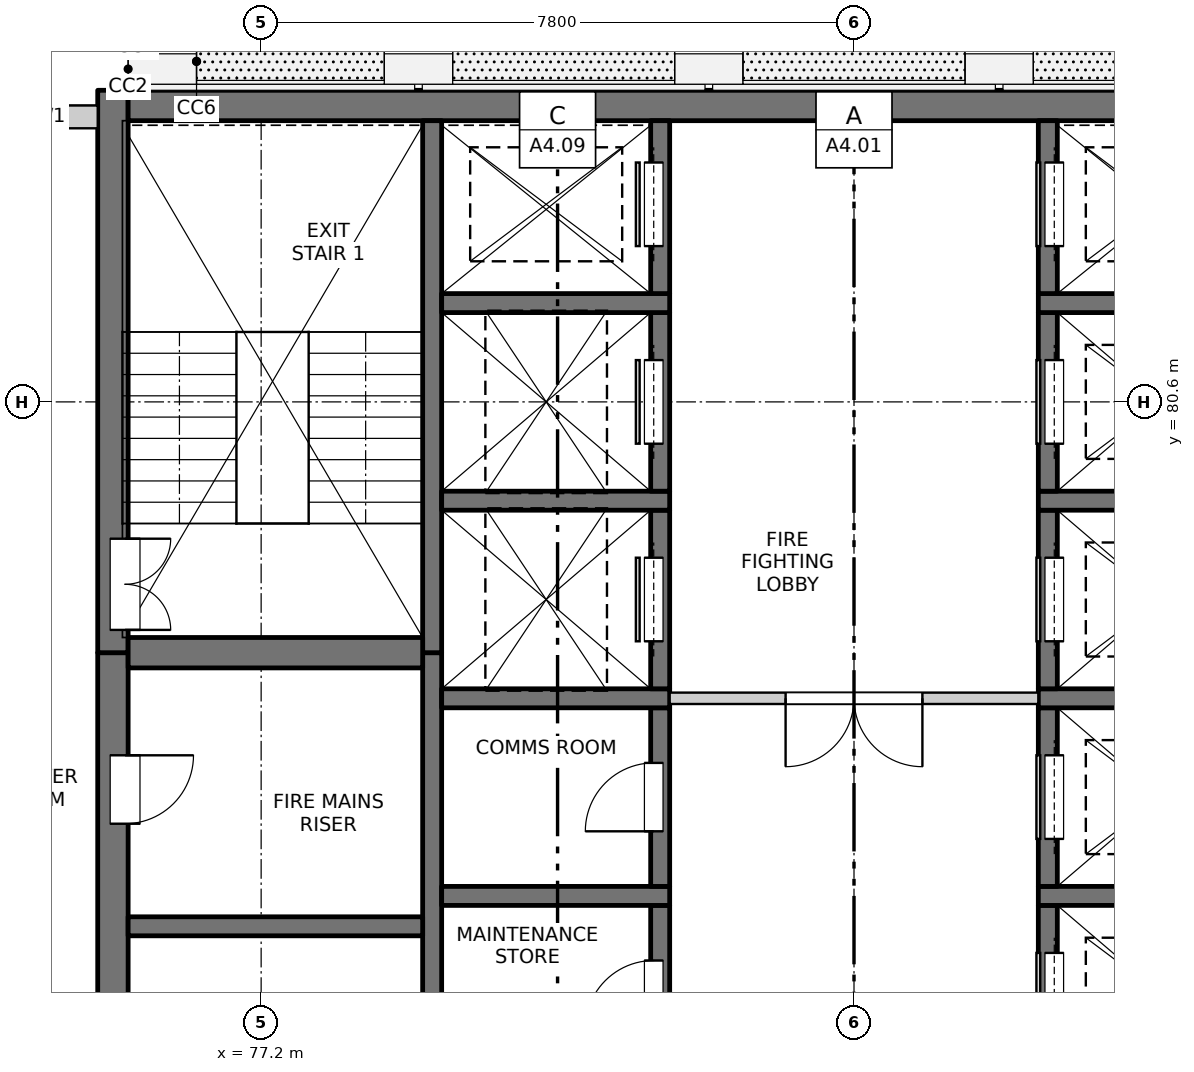
"""IFC4 building model, lengths in metres.
Left out: names, types, materials, properties, quantities, classifications, styles, units other than length and angle.
Written with IfcOpenShell. Run it as: python <this file> out.ifc"""

import sys

from ifc_helpers import new_model, si_unit, direction, frame, frame_2d, origin, place, context, subcontext, project, spatial, rectangle, extrude, element, fill, save


model = new_model("IFC4")
c1 = context("Model", 3, precision=1e-05, world=origin(), true_north=direction((0.0, 1.0)))
c2 = subcontext(c1, "Body", "Model", "MODEL_VIEW")
j1 = project(units=[si_unit("LENGTHUNIT", "METRE"), si_unit("PLANEANGLEUNIT", "RADIAN")], contexts=[c1])
p1 = place(None, origin())
s1 = spatial("IfcSite", under=j1, at=p1, CompositionType="ELEMENT")
p2 = place(p1, origin())
s2 = spatial("IfcBuilding", under=s1, at=p2, CompositionType="ELEMENT")
p3 = place(p2, frame((0.0, 0.0, 252.8)))
s3 = spatial("IfcBuildingStorey", under=s2, at=p3, CompositionType="ELEMENT", Elevation=252.8)
p4 = place(p3, frame((75.25, 55.05, -0.25), z_axis=(0.0, 0.0, 1.0), x_axis=(0.0, 1.0, 0.0)))
e1 = element("IfcWall", 1, at=p4, inside=s3, PredefinedType="SOLIDWALL", context=c2, shape_type="SweptSolid", body=[
    extrude(rectangle(XDim=22.25, YDim=0.4, at=frame_2d((11.125, 0.0))), origin(), (0.0, 0.0, 1.0), 3.4),
])
p5 = place(p4, frame((7.4, 0.0, 0.25)))
e2 = element("IfcOpeningElement", 2, at=p5, cuts=e1, PredefinedType="OPENING", context=c2, shape_type="SweptSolid", body=[
    extrude(rectangle(XDim=0.9, YDim=2.1, at=frame_2d((0.45, 1.05))), frame((0.0, 0.21, 0.0), z_axis=(0.0, -1.0, 0.0), x_axis=(1.0, 0.0, 0.0)), (0.0, 0.0, 1.0), 0.42),
])
p6 = place(p4, frame((10.7, 0.0, 0.25)))
e3 = element("IfcOpeningElement", 3, at=p6, cuts=e1, PredefinedType="OPENING", context=c2, shape_type="SweptSolid", body=[
    extrude(rectangle(XDim=0.9, YDim=2.1, at=frame_2d((0.45, 1.05))), frame((0.0, 0.21, 0.0), z_axis=(0.0, -1.0, 0.0), x_axis=(1.0, 0.0, 0.0)), (0.0, 0.0, 1.0), 0.42),
])
p7 = place(p4, frame((15.2, 0.0, 0.25)))
e4 = element("IfcOpeningElement", 4, at=p7, cuts=e1, PredefinedType="OPENING", context=c2, shape_type="SweptSolid", body=[
    extrude(rectangle(XDim=0.9, YDim=2.1, at=frame_2d((0.45, 1.05))), frame((0.0, 0.21, 0.0), z_axis=(0.0, -1.0, 0.0), x_axis=(1.0, 0.0, 0.0)), (0.0, 0.0, 1.0), 0.42),
])
p8 = place(p4, frame((20.0, 0.0, 0.25)))
e5 = element("IfcOpeningElement", 5, at=p8, cuts=e1, PredefinedType="OPENING", context=c2, shape_type="SweptSolid", body=[
    extrude(rectangle(XDim=0.9, YDim=2.1, at=frame_2d((0.45, 1.05))), frame((0.0, 0.21, 0.0), z_axis=(0.0, -1.0, 0.0), x_axis=(1.0, 0.0, 0.0)), (0.0, 0.0, 1.0), 0.42),
])
p9 = place(p3, frame((75.25, 77.3, -0.25), z_axis=(0.0, 0.0, 1.0), x_axis=(0.0, 1.0, 0.0)))
e6 = element("IfcWall", 6, at=p9, inside=s3, PredefinedType="SOLIDWALL", context=c2, shape_type="SweptSolid", body=[
    extrude(rectangle(XDim=7.4, YDim=0.4, at=frame_2d((3.7, 0.0))), origin(), (0.0, 0.0, 1.0), 3.4),
])
p10 = place(p9, frame((0.3, 0.0, 0.25)))
e7 = element("IfcOpeningElement", 7, at=p10, cuts=e6, PredefinedType="OPENING", context=c2, shape_type="SweptSolid", body=[
    extrude(rectangle(XDim=1.2, YDim=2.1, at=frame_2d((0.6, 1.05))), frame((0.0, 0.21, 0.0), z_axis=(0.0, -1.0, 0.0), x_axis=(1.0, 0.0, 0.0)), (0.0, 0.0, 1.0), 0.42),
])
p11 = place(p3, frame((75.45, 84.5, -0.25), z_axis=(0.0, 0.0, 1.0), x_axis=(1.0, 0.0, 0.0)))
e8 = element("IfcWall", 8, at=p11, inside=s3, PredefinedType="SOLIDWALL", context=c2, shape_type="SweptSolid", body=[
    extrude(rectangle(XDim=19.1, YDim=0.4, at=frame_2d((9.55, 0.0))), origin(), (0.0, 0.0, 1.0), 3.4),
])
p12 = place(p3, frame((79.45, 60.975, -0.25), z_axis=(0.0, 0.0, 1.0), x_axis=(0.0, 1.0, 0.0)))
e9 = element("IfcWall", 9, at=p12, inside=s3, PredefinedType="SOLIDWALL", context=c2, shape_type="SweptSolid", body=[
    extrude(rectangle(XDim=16.325, YDim=0.25, at=frame_2d((8.163, 0.0))), origin(), (0.0, 0.0, 1.0), 3.4),
])
p13 = place(p3, frame((79.45, 77.3, -0.25), z_axis=(0.0, 0.0, 1.0), x_axis=(0.0, 1.0, 0.0)))
e10 = element("IfcWall", 10, at=p13, inside=s3, PredefinedType="SOLIDWALL", context=c2, shape_type="SweptSolid", body=[
    extrude(rectangle(XDim=7.0, YDim=0.25, at=frame_2d((3.5, 0.0))), origin(), (0.0, 0.0, 1.0), 3.4),
])
p14 = place(p3, frame((82.45, 71.625, -0.25), z_axis=(0.0, 0.0, 1.0), x_axis=(0.0, 1.0, 0.0)))
e11 = element("IfcWall", 11, at=p14, inside=s3, PredefinedType="SOLIDWALL", context=c2, shape_type="SweptSolid", body=[
    extrude(rectangle(XDim=2.35, YDim=0.25, at=frame_2d((1.175, 0.0))), origin(), (0.0, 0.0, 1.0), 3.4),
])
p15 = place(p14, frame((0.725, 0.0, 0.25)))
e12 = element("IfcOpeningElement", 12, at=p15, cuts=e11, PredefinedType="OPENING", context=c2, shape_type="SweptSolid", body=[
    extrude(rectangle(XDim=0.9, YDim=2.1, at=frame_2d((0.45, 1.05))), frame((0.0, 0.135, 0.0), z_axis=(0.0, -1.0, 0.0), x_axis=(1.0, 0.0, 0.0)), (0.0, 0.0, 1.0), 0.27),
])
p16 = place(p3, frame((79.575, 74.1, -0.25), z_axis=(0.0, 0.0, 1.0), x_axis=(1.0, 0.0, 0.0)))
e13 = element("IfcWall", 13, at=p16, inside=s3, PredefinedType="SOLIDWALL", context=c2, shape_type="SweptSolid", body=[
    extrude(rectangle(XDim=3.0, YDim=0.25, at=frame_2d((1.5, 0.0))), origin(), (0.0, 0.0, 1.0), 3.4),
])
p17 = place(p3, frame((82.45, 74.225, -0.25), z_axis=(0.0, 0.0, 1.0), x_axis=(0.0, 1.0, 0.0)))
e14 = element("IfcWall", 14, at=p17, inside=s3, PredefinedType="SOLIDWALL", context=c2, shape_type="SweptSolid", body=[
    extrude(rectangle(XDim=2.35, YDim=0.25, at=frame_2d((1.175, 0.0))), origin(), (0.0, 0.0, 1.0), 3.4),
])
p18 = place(p17, frame((0.725, 0.0, 0.25)))
e15 = element("IfcOpeningElement", 15, at=p18, cuts=e14, PredefinedType="OPENING", context=c2, shape_type="SweptSolid", body=[
    extrude(rectangle(XDim=0.9, YDim=2.1, at=frame_2d((0.45, 1.05))), frame((0.0, 0.135, 0.0), z_axis=(0.0, -1.0, 0.0), x_axis=(1.0, 0.0, 0.0)), (0.0, 0.0, 1.0), 0.27),
])
p19 = place(p3, frame((79.575, 76.7, -0.25), z_axis=(0.0, 0.0, 1.0), x_axis=(1.0, 0.0, 0.0)))
e16 = element("IfcWall", 16, at=p19, inside=s3, PredefinedType="SOLIDWALL", context=c2, shape_type="SweptSolid", body=[
    extrude(rectangle(XDim=3.0, YDim=0.25, at=frame_2d((1.5, 0.0))), origin(), (0.0, 0.0, 1.0), 3.4),
])
p20 = place(p3, frame((82.45, 76.825, -0.25), z_axis=(0.0, 0.0, 1.0), x_axis=(0.0, 1.0, 0.0)))
e17 = element("IfcWall", 17, at=p20, inside=s3, PredefinedType="SOLIDWALL", context=c2, shape_type="SweptSolid", body=[
    extrude(rectangle(XDim=2.35, YDim=0.25, at=frame_2d((1.175, 0.0))), origin(), (0.0, 0.0, 1.0), 3.4),
])
p21 = place(p20, frame((0.625, 0.0, 0.25)))
e18 = element("IfcOpeningElement", 18, at=p21, cuts=e17, PredefinedType="OPENING", context=c2, shape_type="SweptSolid", body=[
    extrude(rectangle(XDim=1.1, YDim=2.1, at=frame_2d((0.55, 1.05))), frame((0.0, 0.135, 0.0), z_axis=(0.0, -1.0, 0.0), x_axis=(1.0, 0.0, 0.0)), (0.0, 0.0, 1.0), 0.27),
])
p22 = place(p3, frame((79.575, 79.3, -0.25), z_axis=(0.0, 0.0, 1.0), x_axis=(1.0, 0.0, 0.0)))
e19 = element("IfcWall", 19, at=p22, inside=s3, PredefinedType="SOLIDWALL", context=c2, shape_type="SweptSolid", body=[
    extrude(rectangle(XDim=3.0, YDim=0.25, at=frame_2d((1.5, 0.0))), origin(), (0.0, 0.0, 1.0), 3.4),
])
p23 = place(p3, frame((82.45, 79.425, -0.25), z_axis=(0.0, 0.0, 1.0), x_axis=(0.0, 1.0, 0.0)))
e20 = element("IfcWall", 20, at=p23, inside=s3, PredefinedType="SOLIDWALL", context=c2, shape_type="SweptSolid", body=[
    extrude(rectangle(XDim=2.35, YDim=0.25, at=frame_2d((1.175, 0.0))), origin(), (0.0, 0.0, 1.0), 3.4),
])
p24 = place(p23, frame((0.625, 0.0, 0.25)))
e21 = element("IfcOpeningElement", 21, at=p24, cuts=e20, PredefinedType="OPENING", context=c2, shape_type="SweptSolid", body=[
    extrude(rectangle(XDim=1.1, YDim=2.1, at=frame_2d((0.55, 1.05))), frame((0.0, 0.135, 0.0), z_axis=(0.0, -1.0, 0.0), x_axis=(1.0, 0.0, 0.0)), (0.0, 0.0, 1.0), 0.27),
])
p25 = place(p3, frame((79.575, 81.9, -0.25), z_axis=(0.0, 0.0, 1.0), x_axis=(1.0, 0.0, 0.0)))
e22 = element("IfcWall", 22, at=p25, inside=s3, PredefinedType="SOLIDWALL", context=c2, shape_type="SweptSolid", body=[
    extrude(rectangle(XDim=3.0, YDim=0.25, at=frame_2d((1.5, 0.0))), origin(), (0.0, 0.0, 1.0), 3.4),
])
p26 = place(p3, frame((82.45, 82.025, -0.25), z_axis=(0.0, 0.0, 1.0), x_axis=(0.0, 1.0, 0.0)))
e23 = element("IfcWall", 23, at=p26, inside=s3, PredefinedType="SOLIDWALL", context=c2, shape_type="SweptSolid", body=[
    extrude(rectangle(XDim=2.275, YDim=0.25, at=frame_2d((1.138, 0.0))), origin(), (0.0, 0.0, 1.0), 3.4),
])
p27 = place(p26, frame((0.625, 0.0, 0.25)))
e24 = element("IfcOpeningElement", 24, at=p27, cuts=e23, PredefinedType="OPENING", context=c2, shape_type="SweptSolid", body=[
    extrude(rectangle(XDim=1.1, YDim=2.1, at=frame_2d((0.55, 1.05))), frame((0.0, 0.135, 0.0), z_axis=(0.0, -1.0, 0.0), x_axis=(1.0, 0.0, 0.0)), (0.0, 0.0, 1.0), 0.27),
])
p28 = place(p3, frame((87.55, 71.625, -0.25), z_axis=(0.0, 0.0, 1.0), x_axis=(0.0, 1.0, 0.0)))
e25 = element("IfcWall", 25, at=p28, inside=s3, PredefinedType="SOLIDWALL", context=c2, shape_type="SweptSolid", body=[
    extrude(rectangle(XDim=2.35, YDim=0.25, at=frame_2d((1.175, 0.0))), origin(), (0.0, 0.0, 1.0), 3.4),
])
p29 = place(p28, frame((0.625, 0.0, 0.25)))
e26 = element("IfcOpeningElement", 26, at=p29, cuts=e25, PredefinedType="OPENING", context=c2, shape_type="SweptSolid", body=[
    extrude(rectangle(XDim=1.1, YDim=2.1, at=frame_2d((0.55, 1.05))), frame((0.0, 0.135, 0.0), z_axis=(0.0, -1.0, 0.0), x_axis=(1.0, 0.0, 0.0)), (0.0, 0.0, 1.0), 0.27),
])
p30 = place(p3, frame((87.425, 74.1, -0.25), z_axis=(0.0, 0.0, 1.0), x_axis=(1.0, 0.0, 0.0)))
e27 = element("IfcWall", 27, at=p30, inside=s3, PredefinedType="SOLIDWALL", context=c2, shape_type="SweptSolid", body=[
    extrude(rectangle(XDim=3.0, YDim=0.25, at=frame_2d((1.5, 0.0))), origin(), (0.0, 0.0, 1.0), 3.4),
])
p31 = place(p3, frame((87.55, 74.225, -0.25), z_axis=(0.0, 0.0, 1.0), x_axis=(0.0, 1.0, 0.0)))
e28 = element("IfcWall", 28, at=p31, inside=s3, PredefinedType="SOLIDWALL", context=c2, shape_type="SweptSolid", body=[
    extrude(rectangle(XDim=2.35, YDim=0.25, at=frame_2d((1.175, 0.0))), origin(), (0.0, 0.0, 1.0), 3.4),
])
p32 = place(p31, frame((0.625, 0.0, 0.25)))
e29 = element("IfcOpeningElement", 29, at=p32, cuts=e28, PredefinedType="OPENING", context=c2, shape_type="SweptSolid", body=[
    extrude(rectangle(XDim=1.1, YDim=2.1, at=frame_2d((0.55, 1.05))), frame((0.0, 0.135, 0.0), z_axis=(0.0, -1.0, 0.0), x_axis=(1.0, 0.0, 0.0)), (0.0, 0.0, 1.0), 0.27),
])
p33 = place(p3, frame((87.425, 76.7, -0.25), z_axis=(0.0, 0.0, 1.0), x_axis=(1.0, 0.0, 0.0)))
e30 = element("IfcWall", 30, at=p33, inside=s3, PredefinedType="SOLIDWALL", context=c2, shape_type="SweptSolid", body=[
    extrude(rectangle(XDim=3.0, YDim=0.25, at=frame_2d((1.5, 0.0))), origin(), (0.0, 0.0, 1.0), 3.4),
])
p34 = place(p3, frame((87.55, 76.825, -0.25), z_axis=(0.0, 0.0, 1.0), x_axis=(0.0, 1.0, 0.0)))
e31 = element("IfcWall", 31, at=p34, inside=s3, PredefinedType="SOLIDWALL", context=c2, shape_type="SweptSolid", body=[
    extrude(rectangle(XDim=2.35, YDim=0.25, at=frame_2d((1.175, 0.0))), origin(), (0.0, 0.0, 1.0), 3.4),
])
p35 = place(p34, frame((0.625, 0.0, 0.25)))
e32 = element("IfcOpeningElement", 32, at=p35, cuts=e31, PredefinedType="OPENING", context=c2, shape_type="SweptSolid", body=[
    extrude(rectangle(XDim=1.1, YDim=2.1, at=frame_2d((0.55, 1.05))), frame((0.0, 0.135, 0.0), z_axis=(0.0, -1.0, 0.0), x_axis=(1.0, 0.0, 0.0)), (0.0, 0.0, 1.0), 0.27),
])
p36 = place(p3, frame((87.425, 79.3, -0.25), z_axis=(0.0, 0.0, 1.0), x_axis=(1.0, 0.0, 0.0)))
e33 = element("IfcWall", 33, at=p36, inside=s3, PredefinedType="SOLIDWALL", context=c2, shape_type="SweptSolid", body=[
    extrude(rectangle(XDim=3.0, YDim=0.25, at=frame_2d((1.5, 0.0))), origin(), (0.0, 0.0, 1.0), 3.4),
])
p37 = place(p3, frame((87.55, 79.425, -0.25), z_axis=(0.0, 0.0, 1.0), x_axis=(0.0, 1.0, 0.0)))
e34 = element("IfcWall", 34, at=p37, inside=s3, PredefinedType="SOLIDWALL", context=c2, shape_type="SweptSolid", body=[
    extrude(rectangle(XDim=2.35, YDim=0.25, at=frame_2d((1.175, 0.0))), origin(), (0.0, 0.0, 1.0), 3.4),
])
p38 = place(p37, frame((0.625, 0.0, 0.25)))
e35 = element("IfcOpeningElement", 35, at=p38, cuts=e34, PredefinedType="OPENING", context=c2, shape_type="SweptSolid", body=[
    extrude(rectangle(XDim=1.1, YDim=2.1, at=frame_2d((0.55, 1.05))), frame((0.0, 0.135, 0.0), z_axis=(0.0, -1.0, 0.0), x_axis=(1.0, 0.0, 0.0)), (0.0, 0.0, 1.0), 0.27),
])
p39 = place(p3, frame((87.425, 81.9, -0.25), z_axis=(0.0, 0.0, 1.0), x_axis=(1.0, 0.0, 0.0)))
e36 = element("IfcWall", 36, at=p39, inside=s3, PredefinedType="SOLIDWALL", context=c2, shape_type="SweptSolid", body=[
    extrude(rectangle(XDim=3.0, YDim=0.25, at=frame_2d((1.5, 0.0))), origin(), (0.0, 0.0, 1.0), 3.4),
])
p40 = place(p3, frame((87.55, 82.025, -0.25), z_axis=(0.0, 0.0, 1.0), x_axis=(0.0, 1.0, 0.0)))
e37 = element("IfcWall", 37, at=p40, inside=s3, PredefinedType="SOLIDWALL", context=c2, shape_type="SweptSolid", body=[
    extrude(rectangle(XDim=2.275, YDim=0.25, at=frame_2d((1.138, 0.0))), origin(), (0.0, 0.0, 1.0), 3.4),
])
p41 = place(p40, frame((0.625, 0.0, 0.25)))
e38 = element("IfcOpeningElement", 38, at=p41, cuts=e37, PredefinedType="OPENING", context=c2, shape_type="SweptSolid", body=[
    extrude(rectangle(XDim=1.1, YDim=2.1, at=frame_2d((0.55, 1.05))), frame((0.0, 0.135, 0.0), z_axis=(0.0, -1.0, 0.0), x_axis=(1.0, 0.0, 0.0)), (0.0, 0.0, 1.0), 0.27),
])
p42 = place(p3, frame((75.45, 73.7, -0.25), z_axis=(0.0, 0.0, 1.0), x_axis=(1.0, 0.0, 0.0)))
e39 = element("IfcWall", 39, at=p42, inside=s3, PredefinedType="SOLIDWALL", context=c2, shape_type="SweptSolid", body=[
    extrude(rectangle(XDim=3.875, YDim=0.25, at=frame_2d((1.938, 0.0))), origin(), (0.0, 0.0, 1.0), 3.4),
])
p43 = place(p3, frame((75.45, 77.3, -0.25), z_axis=(0.0, 0.0, 1.0), x_axis=(1.0, 0.0, 0.0)))
e40 = element("IfcWall", 40, at=p43, inside=s3, PredefinedType="SOLIDWALL", context=c2, shape_type="SweptSolid", body=[
    extrude(rectangle(XDim=3.875, YDim=0.4, at=frame_2d((1.938, 0.0))), origin(), (0.0, 0.0, 1.0), 3.4),
])
p44 = place(p3, frame((73.625, 84.35, 0.0), z_axis=(0.0, 0.0, 1.0), x_axis=(1.0, 0.0, 0.0)))
e41 = element("IfcWall", 41, at=p44, inside=s3, PredefinedType="SOLIDWALL", context=c2, shape_type="SweptSolid", body=[
    extrude(rectangle(XDim=1.425, YDim=0.3, at=frame_2d((0.712, 0.0))), origin(), (0.0, 0.0, 1.0), 2.7),
])
p45 = place(p3, frame((82.575, 76.7, 0.0), z_axis=(0.0, 0.0, 1.0), x_axis=(1.0, 0.0, 0.0)))
e42 = element("IfcWall", 42, at=p45, inside=s3, PredefinedType="PARTITIONING", context=c2, shape_type="SweptSolid", body=[
    extrude(rectangle(XDim=4.85, YDim=0.15, at=frame_2d((2.425, 0.0))), origin(), (0.0, 0.0, 1.0), 3.15),
])
p46 = place(p45, frame((1.525, 0.0, 0.0)))
e43 = element("IfcOpeningElement", 43, at=p46, cuts=e42, PredefinedType="OPENING", context=c2, shape_type="SweptSolid", body=[
    extrude(rectangle(XDim=1.8, YDim=2.1, at=frame_2d((0.9, 1.05))), frame((0.0, 0.085, 0.0), z_axis=(0.0, -1.0, 0.0), x_axis=(1.0, 0.0, 0.0)), (0.0, 0.0, 1.0), 0.17),
])
p47 = place(p15, origin())
e44 = element("IfcDoor", 44, at=p47, inside=s3, OperationType="SINGLE_SWING_LEFT", PredefinedType="DOOR", context=c2, shape_type="SweptSolid", body=[
    extrude(rectangle(XDim=0.9, YDim=2.1, at=frame_2d((0.45, 1.05))), frame((0.0, 0.11, 0.0), z_axis=(0.0, -1.0, 0.0), x_axis=(1.0, 0.0, 0.0)), (0.0, 0.0, 1.0), 0.05),
])
fill(e12, e44)
p48 = place(p29, origin())
e45 = element("IfcDoor", 45, at=p48, inside=s3, OperationType="SLIDING_TO_LEFT", PredefinedType="DOOR", context=c2, shape_type="SweptSolid", body=[
    extrude(rectangle(XDim=1.1, YDim=2.1, at=frame_2d((0.55, 1.05))), frame((0.0, -0.06, 0.0), z_axis=(0.0, -1.0, 0.0), x_axis=(1.0, 0.0, 0.0)), (0.0, 0.0, 1.0), 0.05),
])
fill(e26, e45)
p49 = place(p18, origin())
e46 = element("IfcDoor", 46, at=p49, inside=s3, OperationType="SINGLE_SWING_LEFT", PredefinedType="DOOR", context=c2, shape_type="SweptSolid", body=[
    extrude(rectangle(XDim=0.9, YDim=2.1, at=frame_2d((0.45, 1.05))), frame((0.0, 0.11, 0.0), z_axis=(0.0, -1.0, 0.0), x_axis=(1.0, 0.0, 0.0)), (0.0, 0.0, 1.0), 0.05),
])
fill(e15, e46)
p50 = place(p32, origin())
e47 = element("IfcDoor", 47, at=p50, inside=s3, OperationType="SLIDING_TO_LEFT", PredefinedType="DOOR", context=c2, shape_type="SweptSolid", body=[
    extrude(rectangle(XDim=1.1, YDim=2.1, at=frame_2d((0.55, 1.05))), frame((0.0, -0.06, 0.0), z_axis=(0.0, -1.0, 0.0), x_axis=(1.0, 0.0, 0.0)), (0.0, 0.0, 1.0), 0.05),
])
fill(e29, e47)
p51 = place(p8, origin())
e48 = element("IfcDoor", 48, at=p51, inside=s3, OperationType="SINGLE_SWING_LEFT", PredefinedType="DOOR", context=c2, shape_type="SweptSolid", body=[
    extrude(rectangle(XDim=0.9, YDim=2.1, at=frame_2d((0.45, 1.05))), frame((0.0, -0.135, 0.0), z_axis=(0.0, -1.0, 0.0), x_axis=(1.0, 0.0, 0.0)), (0.0, 0.0, 1.0), 0.05),
])
fill(e5, e48)
p52 = place(p46, origin())
e49 = element("IfcDoor", 49, at=p52, inside=s3, OperationType="DOUBLE_DOOR_SINGLE_SWING", PredefinedType="DOOR", context=c2, shape_type="SweptSolid", body=[
    extrude(rectangle(XDim=1.8, YDim=2.1, at=frame_2d((0.9, 1.05))), frame((0.0, 0.025, 0.0), z_axis=(0.0, -1.0, 0.0), x_axis=(1.0, 0.0, 0.0)), (0.0, 0.0, 1.0), 0.05),
])
fill(e43, e49)
p53 = place(p21, origin())
e50 = element("IfcDoor", 50, at=p53, inside=s3, OperationType="SLIDING_TO_LEFT", PredefinedType="DOOR", context=c2, shape_type="SweptSolid", body=[
    extrude(rectangle(XDim=1.1, YDim=2.1, at=frame_2d((0.55, 1.05))), frame((0.0, 0.11, 0.0), z_axis=(0.0, -1.0, 0.0), x_axis=(1.0, 0.0, 0.0)), (0.0, 0.0, 1.0), 0.05),
])
fill(e18, e50)
p54 = place(p35, origin())
e51 = element("IfcDoor", 51, at=p54, inside=s3, OperationType="SLIDING_TO_LEFT", PredefinedType="DOOR", context=c2, shape_type="SweptSolid", body=[
    extrude(rectangle(XDim=1.1, YDim=2.1, at=frame_2d((0.55, 1.05))), frame((0.0, -0.06, 0.0), z_axis=(0.0, -1.0, 0.0), x_axis=(1.0, 0.0, 0.0)), (0.0, 0.0, 1.0), 0.05),
])
fill(e32, e51)
p55 = place(p10, origin())
e52 = element("IfcDoor", 52, at=p55, inside=s3, OperationType="DOUBLE_DOOR_SINGLE_SWING", PredefinedType="DOOR", context=c2, shape_type="SweptSolid", body=[
    extrude(rectangle(XDim=1.2, YDim=2.1, at=frame_2d((0.6, 1.05))), frame((0.0, -0.135, 0.0), z_axis=(0.0, -1.0, 0.0), x_axis=(1.0, 0.0, 0.0)), (0.0, 0.0, 1.0), 0.05),
])
fill(e7, e52)
p56 = place(p24, origin())
e53 = element("IfcDoor", 53, at=p56, inside=s3, OperationType="SLIDING_TO_LEFT", PredefinedType="DOOR", context=c2, shape_type="SweptSolid", body=[
    extrude(rectangle(XDim=1.1, YDim=2.1, at=frame_2d((0.55, 1.05))), frame((0.0, 0.11, 0.0), z_axis=(0.0, -1.0, 0.0), x_axis=(1.0, 0.0, 0.0)), (0.0, 0.0, 1.0), 0.05),
])
fill(e21, e53)
p57 = place(p38, origin())
e54 = element("IfcDoor", 54, at=p57, inside=s3, OperationType="SLIDING_TO_RIGHT", PredefinedType="DOOR", context=c2, shape_type="SweptSolid", body=[
    extrude(rectangle(XDim=1.1, YDim=2.1, at=frame_2d((0.55, 1.05))), frame((0.0, -0.06, 0.0), z_axis=(0.0, -1.0, 0.0), x_axis=(1.0, 0.0, 0.0)), (0.0, 0.0, 1.0), 0.05),
])
fill(e35, e54)
p58 = place(p27, origin())
e55 = element("IfcDoor", 55, at=p58, inside=s3, OperationType="SLIDING_TO_RIGHT", PredefinedType="DOOR", context=c2, shape_type="SweptSolid", body=[
    extrude(rectangle(XDim=1.1, YDim=2.1, at=frame_2d((0.55, 1.05))), frame((0.0, 0.11, 0.0), z_axis=(0.0, -1.0, 0.0), x_axis=(1.0, 0.0, 0.0)), (0.0, 0.0, 1.0), 0.05),
])
fill(e24, e55)
p59 = place(p41, origin())
e56 = element("IfcDoor", 56, at=p59, inside=s3, OperationType="SLIDING_TO_RIGHT", PredefinedType="DOOR", context=c2, shape_type="SweptSolid", body=[
    extrude(rectangle(XDim=1.1, YDim=2.1, at=frame_2d((0.55, 1.05))), frame((0.0, -0.06, 0.0), z_axis=(0.0, -1.0, 0.0), x_axis=(1.0, 0.0, 0.0)), (0.0, 0.0, 1.0), 0.05),
])
fill(e38, e56)
save(model, sys.argv[1])
